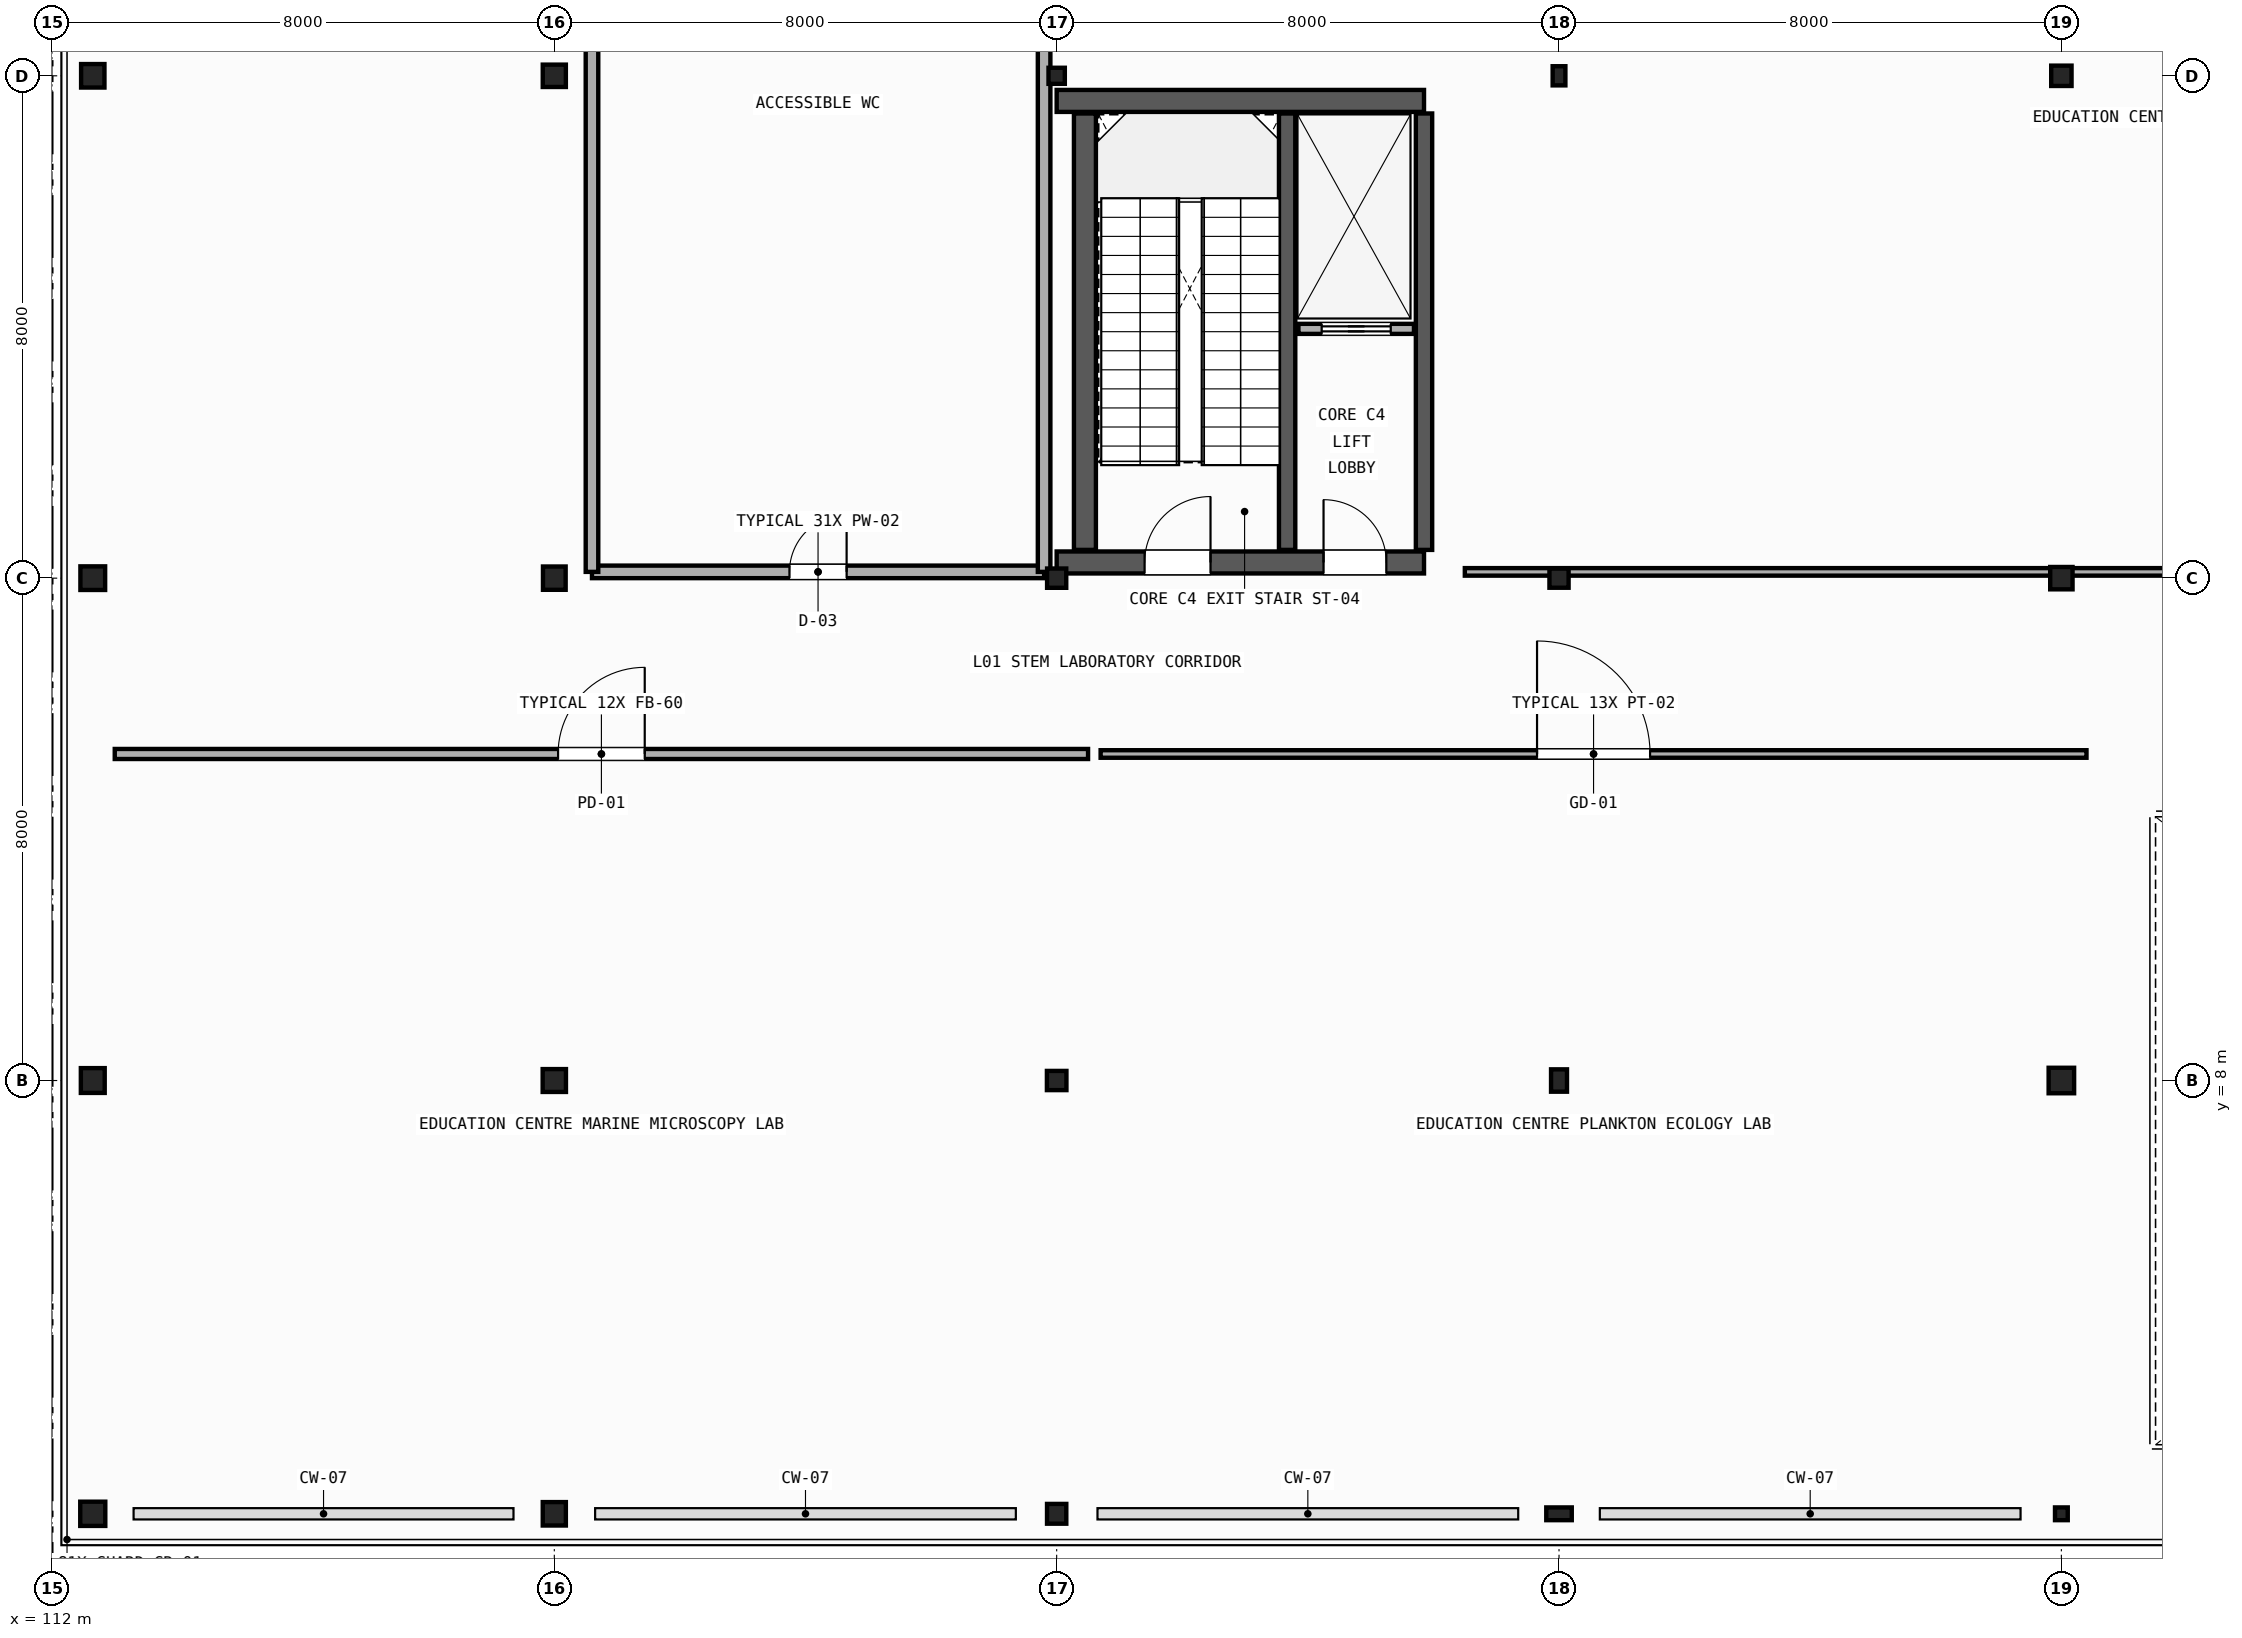
"""IFC4 building model, lengths in metres.
Left out: names, types, materials, properties, quantities, classifications, styles, units other than length and angle.
Written with IfcOpenShell. Run it as: python <this file> out.ifc"""

import sys

from ifc_helpers import new_model, si_unit, direction, frame, frame_2d, origin, origin_2d, place, context, subcontext, project, spatial, rectangle, hollow_rectangle, hollow_circle, i_section, extrude, element, fill, save


model = new_model("IFC4")
c1 = context("Model", 3, precision=1e-05, world=origin(), true_north=direction((0.0, 1.0)))
c2 = subcontext(c1, "Body", "Model", "MODEL_VIEW")
j1 = project(units=[si_unit("LENGTHUNIT", "METRE"), si_unit("PLANEANGLEUNIT", "RADIAN")], contexts=[c1])
p1 = place(None, origin())
s1 = spatial("IfcSite", under=j1, at=p1, CompositionType="ELEMENT")
p2 = place(p1, origin())
s2 = spatial("IfcBuilding", under=s1, at=p2, CompositionType="ELEMENT")
p3 = place(p2, frame((0.0, 0.0, 5.4)))
s3 = spatial("IfcBuildingStorey", under=s2, at=p3, CompositionType="ELEMENT", Elevation=5.4)
p4 = place(p3, frame((112.65, 1.1, 0.0), z_axis=(0.0, 0.0, 1.0), x_axis=(1.0, 0.0, 0.0)))
e1 = element("IfcColumn", 1, at=p4, inside=s3, PredefinedType="COLUMN", context=c2, shape_type="SweptSolid", body=[
    extrude(i_section(OverallWidth=0.399, OverallDepth=0.386, WebThickness=0.021, FlangeThickness=0.033, FilletRadius=0.015, at=origin_2d()), origin(), (0.0, 0.0, 1.0), 4.54),
])
p5 = place(p3, frame((112.65, 8.0, 0.0), z_axis=(0.0, 0.0, 1.0), x_axis=(0.0, 1.0, 0.0)))
e2 = element("IfcColumn", 2, at=p5, inside=s3, PredefinedType="COLUMN", context=c2, shape_type="SweptSolid", body=[
    extrude(i_section(OverallWidth=0.395, OverallDepth=0.38, WebThickness=0.019, FlangeThickness=0.03, FilletRadius=0.015, at=origin_2d()), origin(), (0.0, 0.0, 1.0), 4.54),
])
p6 = place(p3, frame((112.65, 16.0, 0.0), z_axis=(0.0, 0.0, 1.0), x_axis=(1.0, 0.0, 0.0)))
e3 = element("IfcColumn", 3, at=p6, inside=s3, PredefinedType="COLUMN", context=c2, shape_type="SweptSolid", body=[
    extrude(i_section(OverallWidth=0.394, OverallDepth=0.376, WebThickness=0.017, FlangeThickness=0.028, FilletRadius=0.015, at=origin_2d()), origin(), (0.0, 0.0, 1.0), 4.54),
])
p7 = place(p3, frame((112.65, 24.0, 0.0), z_axis=(0.0, 0.0, 1.0), x_axis=(0.0, 1.0, 0.0)))
e4 = element("IfcColumn", 4, at=p7, inside=s3, PredefinedType="COLUMN", context=c2, shape_type="SweptSolid", body=[
    extrude(i_section(OverallWidth=0.374, OverallDepth=0.372, WebThickness=0.016, FlangeThickness=0.026, FilletRadius=0.015, at=origin_2d()), origin(), (0.0, 0.0, 1.0), 4.54),
])
p8 = place(p3, frame((120.0, 1.1, 0.0), z_axis=(0.0, 0.0, 1.0), x_axis=(0.0, 1.0, 0.0)))
e5 = element("IfcColumn", 5, at=p8, inside=s3, PredefinedType="COLUMN", context=c2, shape_type="SweptSolid", body=[
    extrude(i_section(OverallWidth=0.373, OverallDepth=0.368, WebThickness=0.015, FlangeThickness=0.024, FilletRadius=0.015, at=origin_2d()), origin(), (0.0, 0.0, 1.0), 4.54),
])
p9 = place(p3, frame((120.0, 8.0, 0.0), z_axis=(0.0, 0.0, 1.0), x_axis=(1.0, 0.0, 0.0)))
e6 = element("IfcColumn", 6, at=p9, inside=s3, PredefinedType="COLUMN", context=c2, shape_type="SweptSolid", body=[
    extrude(i_section(OverallWidth=0.371, OverallDepth=0.364, WebThickness=0.013, FlangeThickness=0.022, FilletRadius=0.015, at=origin_2d()), origin(), (0.0, 0.0, 1.0), 4.54),
])
p10 = place(p3, frame((120.0, 16.0, 0.0), z_axis=(0.0, 0.0, 1.0), x_axis=(0.0, 1.0, 0.0)))
e7 = element("IfcColumn", 7, at=p10, inside=s3, PredefinedType="COLUMN", context=c2, shape_type="SweptSolid", body=[
    extrude(i_section(OverallWidth=0.371, OverallDepth=0.361, WebThickness=0.012, FlangeThickness=0.02, FilletRadius=0.015, at=origin_2d()), origin(), (0.0, 0.0, 1.0), 4.54),
])
p11 = place(p3, frame((120.0, 24.0, 0.0), z_axis=(0.0, 0.0, 1.0), x_axis=(1.0, 0.0, 0.0)))
e8 = element("IfcColumn", 8, at=p11, inside=s3, PredefinedType="COLUMN", context=c2, shape_type="SweptSolid", body=[
    extrude(i_section(OverallWidth=0.368, OverallDepth=0.356, WebThickness=0.011, FlangeThickness=0.018, FilletRadius=0.015, at=origin_2d()), origin(), (0.0, 0.0, 1.0), 4.54),
])
p12 = place(p3, frame((128.0, 1.1, 0.0), z_axis=(0.0, 0.0, 1.0), x_axis=(1.0, 0.0, 0.0)))
e9 = element("IfcColumn", 9, at=p12, inside=s3, PredefinedType="COLUMN", context=c2, shape_type="SweptSolid", body=[
    extrude(i_section(OverallWidth=0.307, OverallDepth=0.315, WebThickness=0.012, FlangeThickness=0.019, FilletRadius=0.013, at=origin_2d()), origin(), (0.0, 0.0, 1.0), 4.54),
])
p13 = place(p3, frame((128.0, 8.0, 0.0), z_axis=(0.0, 0.0, 1.0), x_axis=(0.0, 1.0, 0.0)))
e10 = element("IfcColumn", 10, at=p13, inside=s3, PredefinedType="COLUMN", context=c2, shape_type="SweptSolid", body=[
    extrude(i_section(OverallWidth=0.306, OverallDepth=0.311, WebThickness=0.011, FlangeThickness=0.017, FilletRadius=0.013, at=origin_2d()), origin(), (0.0, 0.0, 1.0), 4.54),
])
p14 = place(p3, frame((128.0, 16.0, 0.0), z_axis=(0.0, 0.0, 1.0), x_axis=(1.0, 0.0, 0.0)))
e11 = element("IfcColumn", 11, at=p14, inside=s3, PredefinedType="COLUMN", context=c2, shape_type="SweptSolid", body=[
    extrude(i_section(OverallWidth=0.305, OverallDepth=0.307, WebThickness=0.01, FlangeThickness=0.015, FilletRadius=0.013, at=origin_2d()), origin(), (0.0, 0.0, 1.0), 4.54),
])
p15 = place(p3, frame((128.0, 24.0, 0.0), z_axis=(0.0, 0.0, 1.0), x_axis=(0.0, 1.0, 0.0)))
e12 = element("IfcColumn", 12, at=p15, inside=s3, PredefinedType="COLUMN", context=c2, shape_type="SweptSolid", body=[
    extrude(i_section(OverallWidth=0.256, OverallDepth=0.26, WebThickness=0.011, FlangeThickness=0.017, FilletRadius=0.011, at=origin_2d()), origin(), (0.0, 0.0, 1.0), 4.54),
])
p16 = place(p3, frame((136.0, 1.1, 0.0), z_axis=(0.0, 0.0, 1.0), x_axis=(0.0, 1.0, 0.0)))
e13 = element("IfcColumn", 13, at=p16, inside=s3, PredefinedType="COLUMN", context=c2, shape_type="SweptSolid", body=[
    extrude(hollow_rectangle(XDim=0.203, YDim=0.406, WallThickness=0.012, InnerFilletRadius=0.012, OuterFilletRadius=0.024, at=origin_2d()), origin(), (0.0, 0.0, 1.0), 4.54),
])
p17 = place(p3, frame((136.0, 8.0, 0.0), z_axis=(0.0, 0.0, 1.0), x_axis=(1.0, 0.0, 0.0)))
e14 = element("IfcColumn", 14, at=p17, inside=s3, PredefinedType="COLUMN", context=c2, shape_type="SweptSolid", body=[
    extrude(hollow_rectangle(XDim=0.254, YDim=0.356, WallThickness=0.012, InnerFilletRadius=0.012, OuterFilletRadius=0.024, at=origin_2d()), origin(), (0.0, 0.0, 1.0), 4.54),
])
p18 = place(p3, frame((136.0, 16.0, 0.0), z_axis=(0.0, 0.0, 1.0), x_axis=(0.0, 1.0, 0.0)))
e15 = element("IfcColumn", 15, at=p18, inside=s3, PredefinedType="COLUMN", context=c2, shape_type="SweptSolid", body=[
    extrude(hollow_rectangle(XDim=0.305, YDim=0.305, WallThickness=0.012, InnerFilletRadius=0.012, OuterFilletRadius=0.024, at=origin_2d()), origin(), (0.0, 0.0, 1.0), 4.54),
])
p19 = place(p3, frame((136.0, 24.0, 0.0), z_axis=(0.0, 0.0, 1.0), x_axis=(1.0, 0.0, 0.0)))
e16 = element("IfcColumn", 16, at=p19, inside=s3, PredefinedType="COLUMN", context=c2, shape_type="SweptSolid", body=[
    extrude(hollow_rectangle(XDim=0.203, YDim=0.305, WallThickness=0.009, InnerFilletRadius=0.009, OuterFilletRadius=0.018, at=origin_2d()), origin(), (0.0, 0.0, 1.0), 4.54),
])
p20 = place(p3, frame((144.0, 1.1, 0.0), z_axis=(0.0, 0.0, 1.0), x_axis=(1.0, 0.0, 0.0)))
e17 = element("IfcColumn", 17, at=p20, inside=s3, PredefinedType="COLUMN", context=c2, shape_type="SweptSolid", body=[
    extrude(hollow_rectangle(XDim=0.203, YDim=0.203, WallThickness=0.009, InnerFilletRadius=0.009, OuterFilletRadius=0.018, at=origin_2d()), origin(), (0.0, 0.0, 1.0), 4.54),
])
p21 = place(p3, frame((144.0, 8.0, 0.0), z_axis=(0.0, 0.0, 1.0), x_axis=(0.0, 1.0, 0.0)))
e18 = element("IfcColumn", 18, at=p21, inside=s3, PredefinedType="COLUMN", context=c2, shape_type="SweptSolid", body=[
    extrude(hollow_circle(Radius=0.203, WallThickness=0.012, at=origin_2d()), origin(), (0.0, 0.0, 1.0), 4.54),
])
p22 = place(p3, frame((144.0, 16.0, 0.0), z_axis=(0.0, 0.0, 1.0), x_axis=(1.0, 0.0, 0.0)))
e19 = element("IfcColumn", 19, at=p22, inside=s3, PredefinedType="COLUMN", context=c2, shape_type="SweptSolid", body=[
    extrude(hollow_circle(Radius=0.178, WallThickness=0.012, at=origin_2d()), origin(), (0.0, 0.0, 1.0), 4.54),
])
p23 = place(p3, frame((144.0, 24.0, 0.0), z_axis=(0.0, 0.0, 1.0), x_axis=(0.0, 1.0, 0.0)))
e20 = element("IfcColumn", 20, at=p23, inside=s3, PredefinedType="COLUMN", context=c2, shape_type="SweptSolid", body=[
    extrude(hollow_circle(Radius=0.162, WallThickness=0.012, at=origin_2d()), origin(), (0.0, 0.0, 1.0), 4.54),
])
p24 = place(p3, frame((128.0, 16.25, 0.0), z_axis=(0.0, 0.0, 1.0), x_axis=(1.0, 0.0, 0.0)))
e21 = element("IfcWall", 21, at=p24, inside=s3, PredefinedType="SHEAR", context=c2, shape_type="SweptSolid", body=[
    extrude(rectangle(XDim=5.85, YDim=0.35, at=frame_2d((2.925, 0.0))), origin(), (0.0, 0.0, 1.0), 4.53),
])
p25 = place(p24, frame((1.4, 0.0, 0.0)))
e22 = element("IfcOpeningElement", 22, at=p25, cuts=e21, PredefinedType="OPENING", context=c2, shape_type="SweptSolid", body=[
    extrude(rectangle(XDim=1.05, YDim=2.1, at=frame_2d((0.525, 1.05))), frame((0.0, 0.185, 0.0), z_axis=(0.0, -1.0, 0.0), x_axis=(1.0, 0.0, 0.0)), (0.0, 0.0, 1.0), 0.37),
])
p26 = place(p24, frame((4.25, 0.0, 0.0)))
e23 = element("IfcOpeningElement", 23, at=p26, cuts=e21, PredefinedType="OPENING", context=c2, shape_type="SweptSolid", body=[
    extrude(rectangle(XDim=1.0, YDim=2.15, at=frame_2d((0.5, 1.075))), frame((0.0, 0.185, 0.0), z_axis=(0.0, -1.0, 0.0), x_axis=(1.0, 0.0, 0.0)), (0.0, 0.0, 1.0), 0.37),
])
p27 = place(p3, frame((128.0, 23.6, 0.0), z_axis=(0.0, 0.0, 1.0), x_axis=(1.0, 0.0, 0.0)))
e24 = element("IfcWall", 24, at=p27, inside=s3, PredefinedType="SHEAR", context=c2, shape_type="SweptSolid", body=[
    extrude(rectangle(XDim=5.85, YDim=0.35, at=frame_2d((2.925, 0.0))), origin(), (0.0, 0.0, 1.0), 4.53),
])
p28 = place(p3, frame((128.45, 16.45, 0.0), z_axis=(0.0, 0.0, 1.0), x_axis=(0.0, 1.0, 0.0)))
e25 = element("IfcWall", 25, at=p28, inside=s3, PredefinedType="SHEAR", context=c2, shape_type="SweptSolid", body=[
    extrude(rectangle(XDim=6.95, YDim=0.35, at=frame_2d((3.475, 0.0))), origin(), (0.0, 0.0, 1.0), 4.53),
])
for number, where, z_axis, x_axis in (
    (26, (133.85, 16.45, 0.0), (0.0, 0.0, 1.0), (0.0, 1.0, 0.0)),
    (27, (131.67, 16.45, 0.0), (0.0, 0.0, 1.0), (0.0, 1.0, 0.0)),
):
    element("IfcWall", number, at=place(p3, frame(where, z_axis=z_axis, x_axis=x_axis)), inside=s3, PredefinedType="SHEAR", context=c2, shape_type="SweptSolid", body=[
        extrude(rectangle(XDim=6.95, YDim=0.26, at=frame_2d((3.475, 0.0))), origin(), (0.0, 0.0, 1.0), 4.53),
    ])
p29 = place(p3, frame((131.85, 19.97, 0.0), z_axis=(0.0, 0.0, 1.0), x_axis=(1.0, 0.0, 0.0)))
e28 = element("IfcWall", 28, at=p29, inside=s3, PredefinedType="PARTITIONING", context=c2, shape_type="SweptSolid", body=[
    extrude(rectangle(XDim=1.84, YDim=0.16, at=frame_2d((0.92, 0.0))), origin(), (0.0, 0.0, 1.0), 3.6),
])
p30 = place(p29, frame((0.37, 0.0, 0.0)))
e29 = element("IfcOpeningElement", 29, at=p30, cuts=e28, PredefinedType="OPENING", context=c2, shape_type="SweptSolid", body=[
    extrude(rectangle(XDim=1.1, YDim=2.15, at=frame_2d((0.55, 1.075))), frame((0.0, 0.09, 0.0), z_axis=(0.0, -1.0, 0.0), x_axis=(1.0, 0.0, 0.0)), (0.0, 0.0, 1.0), 0.18),
])
p31 = place(p3, frame((113.0, 13.2, 0.0), z_axis=(0.0, 0.0, 1.0), x_axis=(1.0, 0.0, 0.0)))
e30 = element("IfcWall", 30, at=p31, inside=s3, PredefinedType="PARTITIONING", context=c2, shape_type="SweptSolid", body=[
    extrude(rectangle(XDim=15.5, YDim=0.16, at=frame_2d((7.75, 0.0))), origin(), (0.0, 0.0, 1.0), 3.898),
])
p32 = place(p31, frame((7.06, 0.0, 0.0)))
e31 = element("IfcOpeningElement", 31, at=p32, cuts=e30, PredefinedType="OPENING", context=c2, shape_type="SweptSolid", body=[
    extrude(rectangle(XDim=1.38, YDim=2.25, at=frame_2d((0.69, 1.125))), frame((0.0, 0.09, 0.0), z_axis=(0.0, -1.0, 0.0), x_axis=(1.0, 0.0, 0.0)), (0.0, 0.0, 1.0), 0.18),
])
p33 = place(p3, frame((128.7, 13.2, 0.0), z_axis=(0.0, 0.0, 1.0), x_axis=(1.0, 0.0, 0.0)))
e32 = element("IfcWall", 32, at=p33, inside=s3, PredefinedType="PARTITIONING", context=c2, shape_type="SweptSolid", body=[
    extrude(rectangle(XDim=15.7, YDim=0.12, at=frame_2d((7.85, 0.0))), origin(), (0.0, 0.0, 1.0), 3.738),
])
p34 = place(p33, frame((6.95, 0.0, 0.0)))
e33 = element("IfcOpeningElement", 33, at=p34, cuts=e32, PredefinedType="OPENING", context=c2, shape_type="SweptSolid", body=[
    extrude(rectangle(XDim=1.8, YDim=2.4, at=frame_2d((0.9, 1.2))), frame((0.0, 0.07, 0.0), z_axis=(0.0, -1.0, 0.0), x_axis=(1.0, 0.0, 0.0)), (0.0, 0.0, 1.0), 0.14),
])
p35 = place(p3, frame((120.6, 16.1, 0.0), z_axis=(0.0, 0.0, 1.0), x_axis=(1.0, 0.0, 0.0)))
e34 = element("IfcWall", 34, at=p35, inside=s3, PredefinedType="PLUMBINGWALL", context=c2, shape_type="SweptSolid", body=[
    extrude(rectangle(XDim=7.2, YDim=0.2, at=frame_2d((3.6, 0.0))), origin(), (0.0, 0.0, 1.0), 3.892),
])
p36 = place(p35, frame((3.145, 0.0, 0.0)))
e35 = element("IfcOpeningElement", 35, at=p36, cuts=e34, PredefinedType="OPENING", context=c2, shape_type="SweptSolid", body=[
    extrude(rectangle(XDim=0.91, YDim=2.1, at=frame_2d((0.455, 1.05))), frame((0.0, 0.11, 0.0), z_axis=(0.0, -1.0, 0.0), x_axis=(1.0, 0.0, 0.0)), (0.0, 0.0, 1.0), 0.22),
])
p37 = place(p3, frame((120.6, 16.1, 0.0), z_axis=(0.0, 0.0, 1.0), x_axis=(0.0, 1.0, 0.0)))
e36 = element("IfcWall", 36, at=p37, inside=s3, PredefinedType="PLUMBINGWALL", context=c2, shape_type="SweptSolid", body=[
    extrude(rectangle(XDim=14.9, YDim=0.2, at=frame_2d((7.45, 0.0))), origin(), (0.0, 0.0, 1.0), 3.898),
])
p38 = place(p3, frame((127.8, 16.1, 0.0), z_axis=(0.0, 0.0, 1.0), x_axis=(0.0, 1.0, 0.0)))
e37 = element("IfcWall", 37, at=p38, inside=s3, PredefinedType="PLUMBINGWALL", context=c2, shape_type="SweptSolid", body=[
    extrude(rectangle(XDim=14.9, YDim=0.2, at=frame_2d((7.45, 0.0))), origin(), (0.0, 0.0, 1.0), 3.738),
])
p39 = place(p3, frame((134.5, 16.1, 0.0), z_axis=(0.0, 0.0, 1.0), x_axis=(1.0, 0.0, 0.0)))
e38 = element("IfcWall", 38, at=p39, inside=s3, PredefinedType="PARTITIONING", context=c2, shape_type="SweptSolid", body=[
    extrude(rectangle(XDim=24.5, YDim=0.12, at=frame_2d((12.25, 0.0))), origin(), (0.0, 0.0, 1.0), 3.738),
])
p40 = place(p39, frame((11.575, 0.0, 0.0)))
e39 = element("IfcOpeningElement", 39, at=p40, cuts=e38, PredefinedType="OPENING", context=c2, shape_type="SweptSolid", body=[
    extrude(rectangle(XDim=1.35, YDim=2.25, at=frame_2d((0.675, 1.125))), frame((0.0, 0.07, 0.0), z_axis=(0.0, -1.0, 0.0), x_axis=(1.0, 0.0, 0.0)), (0.0, 0.0, 1.0), 0.14),
])
p41 = place(p30, origin())
e40 = element("IfcDoor", 40, at=p41, inside=s3, OperationType="SLIDING_TO_LEFT", PredefinedType="DOOR", context=c2, shape_type="SweptSolid", body=[
    extrude(rectangle(XDim=1.1, YDim=2.15, at=frame_2d((0.55, 1.075))), frame((0.0, 0.025, 0.0), z_axis=(0.0, -1.0, 0.0), x_axis=(1.0, 0.0, 0.0)), (0.0, 0.0, 1.0), 0.05),
])
fill(e29, e40)
p42 = place(p25, origin())
e41 = element("IfcDoor", 41, at=p42, inside=s3, OperationType="SINGLE_SWING_RIGHT", PredefinedType="DOOR", context=c2, shape_type="SweptSolid", body=[
    extrude(rectangle(XDim=1.05, YDim=2.1, at=frame_2d((0.525, 1.05))), frame((0.0, 0.025, 0.0), z_axis=(0.0, -1.0, 0.0), x_axis=(1.0, 0.0, 0.0)), (0.0, 0.0, 1.0), 0.05),
])
fill(e22, e41)
p43 = place(p26, origin())
e42 = element("IfcDoor", 42, at=p43, inside=s3, OperationType="SINGLE_SWING_LEFT", PredefinedType="DOOR", context=c2, shape_type="SweptSolid", body=[
    extrude(rectangle(XDim=1.0, YDim=2.15, at=frame_2d((0.5, 1.075))), frame((0.0, 0.025, 0.0), z_axis=(0.0, -1.0, 0.0), x_axis=(1.0, 0.0, 0.0)), (0.0, 0.0, 1.0), 0.05),
])
fill(e23, e42)
p44 = place(p32, origin())
e43 = element("IfcDoor", 43, at=p44, inside=s3, OperationType="SINGLE_SWING_RIGHT", PredefinedType="DOOR", context=c2, shape_type="SweptSolid", body=[
    extrude(rectangle(XDim=1.38, YDim=2.25, at=frame_2d((0.69, 1.125))), frame((0.0, 0.025, 0.0), z_axis=(0.0, -1.0, 0.0), x_axis=(1.0, 0.0, 0.0)), (0.0, 0.0, 1.0), 0.05),
])
fill(e31, e43)
p45 = place(p34, origin())
e44 = element("IfcDoor", 44, at=p45, inside=s3, OperationType="SINGLE_SWING_LEFT", PredefinedType="DOOR", context=c2, shape_type="SweptSolid", body=[
    extrude(rectangle(XDim=1.8, YDim=2.4, at=frame_2d((0.9, 1.2))), frame((0.0, 0.025, 0.0), z_axis=(0.0, -1.0, 0.0), x_axis=(1.0, 0.0, 0.0)), (0.0, 0.0, 1.0), 0.05),
])
fill(e33, e44)
p46 = place(p36, origin())
e45 = element("IfcDoor", 45, at=p46, inside=s3, OperationType="SINGLE_SWING_RIGHT", PredefinedType="DOOR", context=c2, shape_type="SweptSolid", body=[
    extrude(rectangle(XDim=0.91, YDim=2.1, at=frame_2d((0.455, 1.05))), frame((0.0, 0.025, 0.0), z_axis=(0.0, -1.0, 0.0), x_axis=(1.0, 0.0, 0.0)), (0.0, 0.0, 1.0), 0.05),
])
fill(e35, e45)
save(model, sys.argv[1])
